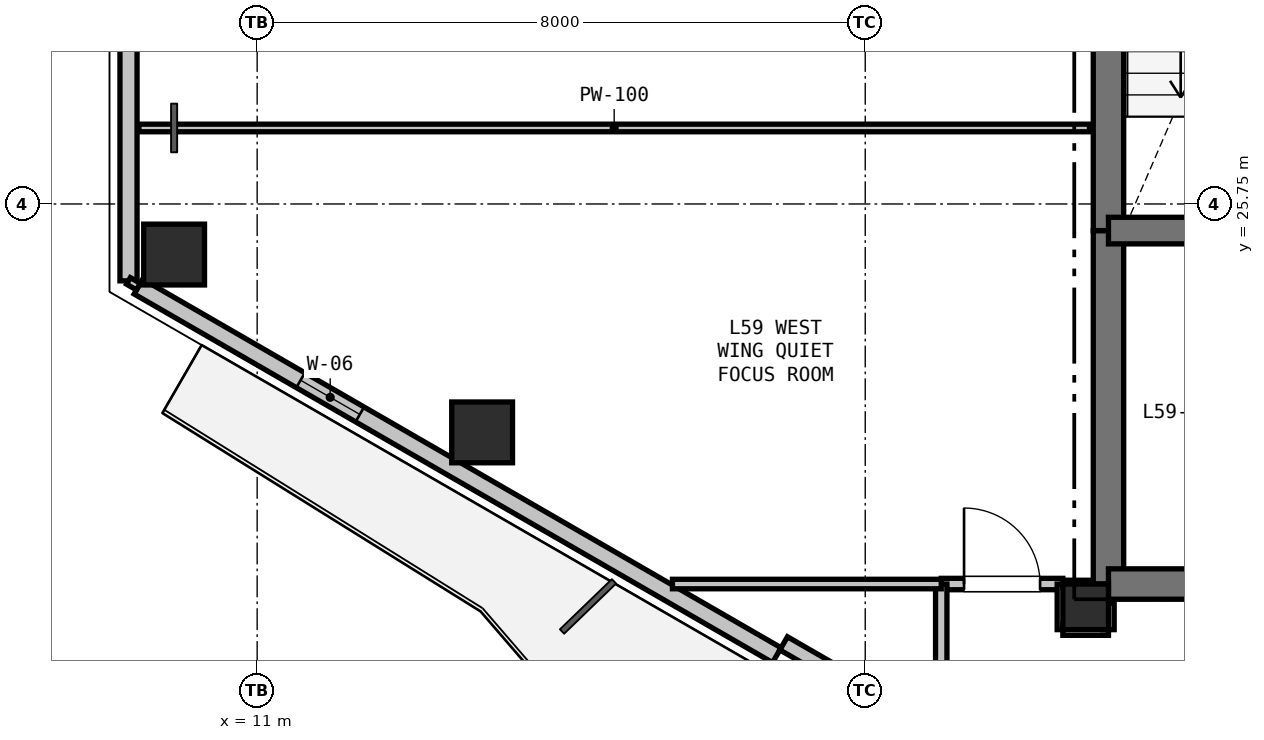
"""IFC4 building model, lengths in metres.
Left out: names, types, materials, properties, quantities, classifications, styles, units other than length and angle.
Written with IfcOpenShell. Run it as: python <this file> out.ifc"""

import sys

from ifc_helpers import new_model, si_unit, direction, frame, frame_2d, origin, origin_2d, place, context, subcontext, project, spatial, rectangle, hollow_rectangle, extrude, element, fill, save


model = new_model("IFC4")
c1 = context("Model", 3, precision=1e-05, world=origin(), true_north=direction((0.0, 1.0)))
c2 = subcontext(c1, "Body", "Model", "MODEL_VIEW")
j1 = project(units=[si_unit("LENGTHUNIT", "METRE"), si_unit("PLANEANGLEUNIT", "RADIAN")], contexts=[c1])
p1 = place(None, origin())
s1 = spatial("IfcSite", under=j1, at=p1, CompositionType="ELEMENT")
p2 = place(p1, origin())
s2 = spatial("IfcBuilding", under=s1, at=p2, CompositionType="ELEMENT")
p3 = place(p2, frame((0.0, 0.0, 211.8)))
s3 = spatial("IfcBuildingStorey", under=s2, at=p3, CompositionType="ELEMENT", Elevation=211.8)
p4 = place(p3, frame((21.9, 20.45, 0.0), z_axis=(0.0, 0.0, 1.0), x_axis=(1.0, 0.0, 0.0)))
e1 = element("IfcColumn", 1, at=p4, inside=s3, PredefinedType="COLUMN", context=c2, shape_type="SweptSolid", body=[
    extrude(rectangle(XDim=0.6, YDim=0.6, at=origin_2d()), origin(), (0.0, 0.0, 1.0), 3.3),
])
for number, where, z_axis, x_axis in (
    (2, (13.96, 22.745, 0.0), (0.0, 0.0, 1.0), (1.0, 0.0, 0.0)),
    (3, (9.907, 25.085, 0.0), (0.0, 0.0, 1.0), (1.0, 0.0, 0.0)),
):
    element("IfcColumn", number, at=place(p3, frame(where, z_axis=z_axis, x_axis=x_axis)), inside=s3, PredefinedType="COLUMN", context=c2, shape_type="SweptSolid", body=[
        extrude(hollow_rectangle(XDim=0.8, YDim=0.8, WallThickness=0.025, at=origin_2d()), origin(), (0.0, 0.0, 1.0), 3.3),
    ])
p5 = place(p3, frame((9.308, 24.738, 0.0), z_axis=(0.0, 0.0, 1.0), x_axis=(0.0, 1.0, 0.0)))
e4 = element("IfcWall", 4, at=p5, inside=s3, PredefinedType="SOLIDWALL", context=c2, shape_type="SweptSolid", body=[
    extrude(rectangle(XDim=4.023, YDim=0.225, at=frame_2d((2.012, 0.0))), origin(), (0.0, 0.0, 1.0), 2.69),
])
p6 = place(p3, frame((17.837, 19.814, 0.0), z_axis=(0.0, 0.0, 1.0), x_axis=(-0.866027133173, 0.499997004599, 0.0)))
e5 = element("IfcWall", 5, at=p6, inside=s3, PredefinedType="SOLIDWALL", context=c2, shape_type="SweptSolid", body=[
    extrude(rectangle(XDim=9.699, YDim=0.225, at=frame_2d((4.849, 0.0))), origin(), (0.0, 0.0, 1.0), 2.69),
])
p7 = place(p6, frame((6.335, 0.0, 0.9)))
e6 = element("IfcOpeningElement", 6, at=p7, cuts=e5, PredefinedType="OPENING", context=c2, shape_type="SweptSolid", body=[
    extrude(rectangle(XDim=0.9, YDim=1.4, at=frame_2d((0.45, 0.7))), frame((0.0, 0.123, 0.0), z_axis=(0.0, -1.0, 0.0), x_axis=(1.0, 0.0, 0.0)), (0.0, 0.0, 1.0), 0.245),
])
p8 = place(p3, frame((19.399, 19.12, 0.0), z_axis=(0.0, 0.0, 1.0), x_axis=(-0.86605165483, 0.499954529098, 0.0)))
e7 = element("IfcWall", 7, at=p8, inside=s3, PredefinedType="PARAPET", context=c2, shape_type="SweptSolid", body=[
    extrude(rectangle(XDim=1.7, YDim=0.2, at=frame_2d((0.85, 0.0))), origin(), (0.0, 0.0, 1.0), 2.69),
])
p9 = place(p3, frame((22.2, 20.75, 0.0), z_axis=(0.0, 0.0, 1.0), x_axis=(0.0, 1.0, 0.0)))
e8 = element("IfcWall", 8, at=p9, inside=s3, PredefinedType="SHEAR", context=c2, shape_type="SweptSolid", body=[
    extrude(rectangle(XDim=4.65, YDim=0.4, at=frame_2d((2.325, 0.0))), origin(), (0.0, 0.0, 1.0), 3.07),
])
p10 = place(p3, frame((22.2, 25.4, 0.0), z_axis=(0.0, 0.0, 1.0), x_axis=(0.0, 1.0, 0.0)))
e9 = element("IfcWall", 9, at=p10, inside=s3, PredefinedType="SHEAR", context=c2, shape_type="SweptSolid", body=[
    extrude(rectangle(XDim=7.35, YDim=0.4, at=frame_2d((3.675, 0.0))), origin(), (0.0, 0.0, 1.0), 3.07),
])
p11 = place(p3, frame((25.65, 20.75, 0.0), z_axis=(0.0, 0.0, 1.0), x_axis=(-1.0, 0.0, 0.0)))
e10 = element("IfcWall", 10, at=p11, inside=s3, PredefinedType="SHEAR", context=c2, shape_type="SweptSolid", body=[
    extrude(rectangle(XDim=3.45, YDim=0.4, at=frame_2d((1.725, 0.0))), origin(), (0.0, 0.0, 1.0), 3.07),
])
p12 = place(p11, frame((0.65, 0.0, 0.0)))
e11 = element("IfcOpeningElement", 11, at=p12, cuts=e10, PredefinedType="OPENING", context=c2, shape_type="SweptSolid", body=[
    extrude(rectangle(XDim=1.15, YDim=2.15, at=frame_2d((0.575, 1.075))), frame((0.0, 0.21, 0.0), z_axis=(0.0, -1.0, 0.0), x_axis=(1.0, 0.0, 0.0)), (0.0, 0.0, 1.0), 0.42),
])
p13 = place(p3, frame((22.2, 25.4, 0.0), z_axis=(0.0, 0.0, 1.0), x_axis=(1.0, 0.0, 0.0)))
e12 = element("IfcWall", 12, at=p13, inside=s3, PredefinedType="SHEAR", context=c2, shape_type="SweptSolid", body=[
    extrude(rectangle(XDim=3.45, YDim=0.35, at=frame_2d((1.725, 0.0))), origin(), (0.0, 0.0, 1.0), 3.07),
])
p14 = place(p13, frame((1.15, 0.0, 0.0)))
e13 = element("IfcOpeningElement", 13, at=p14, cuts=e12, PredefinedType="OPENING", context=c2, shape_type="SweptSolid", body=[
    extrude(rectangle(XDim=1.15, YDim=2.15, at=frame_2d((0.575, 1.075))), frame((0.0, 0.185, 0.0), z_axis=(0.0, -1.0, 0.0), x_axis=(1.0, 0.0, 0.0)), (0.0, 0.0, 1.0), 0.37),
])
p15 = place(p3, frame((20.0, 20.75, 0.0), z_axis=(0.0, 0.0, 1.0), x_axis=(1.0, 0.0, 0.0)))
e14 = element("IfcWall", 14, at=p15, inside=s3, PredefinedType="PARTITIONING", context=c2, shape_type="SweptSolid", body=[
    extrude(rectangle(XDim=1.6, YDim=0.15, at=frame_2d((0.8, 0.0))), origin(), (0.0, 0.0, 1.0), 2.518),
])
p16 = place(p15, frame((0.3, 0.0, 0.0)))
e15 = element("IfcOpeningElement", 15, at=p16, cuts=e14, PredefinedType="OPENING", context=c2, shape_type="SweptSolid", body=[
    extrude(rectangle(XDim=1.0, YDim=2.15, at=frame_2d((0.5, 1.075))), frame((0.0, 0.085, 0.0), z_axis=(0.0, -1.0, 0.0), x_axis=(1.0, 0.0, 0.0)), (0.0, 0.0, 1.0), 0.17),
])
p17 = place(p3, frame((21.6, 20.75, 0.0), z_axis=(0.0, 0.0, 1.0), x_axis=(0.0, -1.0, 0.0)))
e16 = element("IfcWall", 16, at=p17, inside=s3, PredefinedType="PARTITIONING", context=c2, shape_type="SweptSolid", body=[
    extrude(rectangle(XDim=0.6, YDim=0.15, at=frame_2d((0.3, 0.0))), origin(), (0.0, 0.0, 1.0), 2.518),
])
p18 = place(p3, frame((21.6, 20.15, 0.0), z_axis=(0.0, 0.0, 1.0), x_axis=(1.0, 0.0, 0.0)))
e17 = element("IfcWall", 17, at=p18, inside=s3, PredefinedType="PARTITIONING", context=c2, shape_type="SweptSolid", body=[
    extrude(rectangle(XDim=0.6, YDim=0.15, at=frame_2d((0.3, 0.0))), origin(), (0.0, 0.0, 1.0), 2.518),
])
p19 = place(p3, frame((22.2, 20.15, 0.0), z_axis=(0.0, 0.0, 1.0), x_axis=(0.0, 1.0, 0.0)))
e18 = element("IfcWall", 18, at=p19, inside=s3, PredefinedType="PARTITIONING", context=c2, shape_type="SweptSolid", body=[
    extrude(rectangle(XDim=0.35, YDim=0.15, at=frame_2d((0.175, 0.0))), origin(), (0.0, 0.0, 1.0), 2.518),
])
p20 = place(p3, frame((20.0, 18.609, 0.0), z_axis=(0.0, 0.0, 1.0), x_axis=(0.0, 1.0, 0.0)))
e19 = element("IfcWall", 19, at=p20, inside=s3, PredefinedType="PARTITIONING", context=c2, shape_type="SweptSolid", body=[
    extrude(rectangle(XDim=2.141, YDim=0.15, at=frame_2d((1.071, 0.0))), origin(), (0.0, 0.0, 1.0), 2.365),
])
p21 = place(p3, frame((21.95, 26.75, 0.0), z_axis=(0.0, 0.0, 1.0), x_axis=(-1.0, 0.0, 0.0)))
e20 = element("IfcWall", 20, at=p21, inside=s3, PredefinedType="PARTITIONING", context=c2, shape_type="SweptSolid", body=[
    extrude(rectangle(XDim=12.506, YDim=0.1, at=frame_2d((6.253, 0.0))), origin(), (0.0, 0.0, 1.0), 2.595),
])
p22 = place(p3, frame((21.95, 20.75, 0.0), z_axis=(0.0, 0.0, 1.0), x_axis=(-1.0, 0.0, 0.0)))
e21 = element("IfcWall", 21, at=p22, inside=s3, PredefinedType="PARTITIONING", context=c2, shape_type="SweptSolid", body=[
    extrude(rectangle(XDim=0.35, YDim=0.1, at=frame_2d((0.175, 0.0))), origin(), (0.0, 0.0, 1.0), 2.595),
])
p23 = place(p3, frame((20.0, 20.75, 0.0), z_axis=(0.0, 0.0, 1.0), x_axis=(-1.0, 0.0, 0.0)))
e22 = element("IfcWall", 22, at=p23, inside=s3, PredefinedType="PARTITIONING", context=c2, shape_type="SweptSolid", body=[
    extrude(rectangle(XDim=3.536, YDim=0.125, at=frame_2d((1.768, 0.0))), origin(), (0.0, 0.0, 1.0), 2.365),
])
p24 = place(p3, frame((9.437, 24.663, 0.0), z_axis=(0.0, 0.0, 1.0), x_axis=(-0.865833797362, 0.500331725305, 0.0)))
e23 = element("IfcWall", 23, at=p24, inside=s3, PredefinedType="PARTITIONING", context=c2, shape_type="SweptSolid", body=[
    extrude(rectangle(XDim=0.15, YDim=0.1, at=frame_2d((0.075, 0.0))), origin(), (0.0, 0.0, 1.0), 3.07),
])
p25 = place(p7, origin())
e24 = element("IfcWindow", 24, at=p25, inside=s3, PartitioningType="SINGLE_PANEL", PredefinedType="WINDOW", context=c2, shape_type="SweptSolid", body=[
    extrude(rectangle(XDim=0.9, YDim=1.4, at=frame_2d((0.45, 0.7))), frame((0.0, 0.03, 0.0), z_axis=(0.0, -1.0, 0.0), x_axis=(1.0, 0.0, 0.0)), (0.0, 0.0, 1.0), 0.06),
])
fill(e6, e24)
p26 = place(p16, origin())
e25 = element("IfcDoor", 25, at=p26, inside=s3, OperationType="SINGLE_SWING_LEFT", PredefinedType="DOOR", context=c2, shape_type="SweptSolid", body=[
    extrude(rectangle(XDim=1.0, YDim=2.15, at=frame_2d((0.5, 1.075))), frame((0.0, 0.025, 0.0), z_axis=(0.0, -1.0, 0.0), x_axis=(1.0, 0.0, 0.0)), (0.0, 0.0, 1.0), 0.05),
])
fill(e15, e25)
save(model, sys.argv[1])
